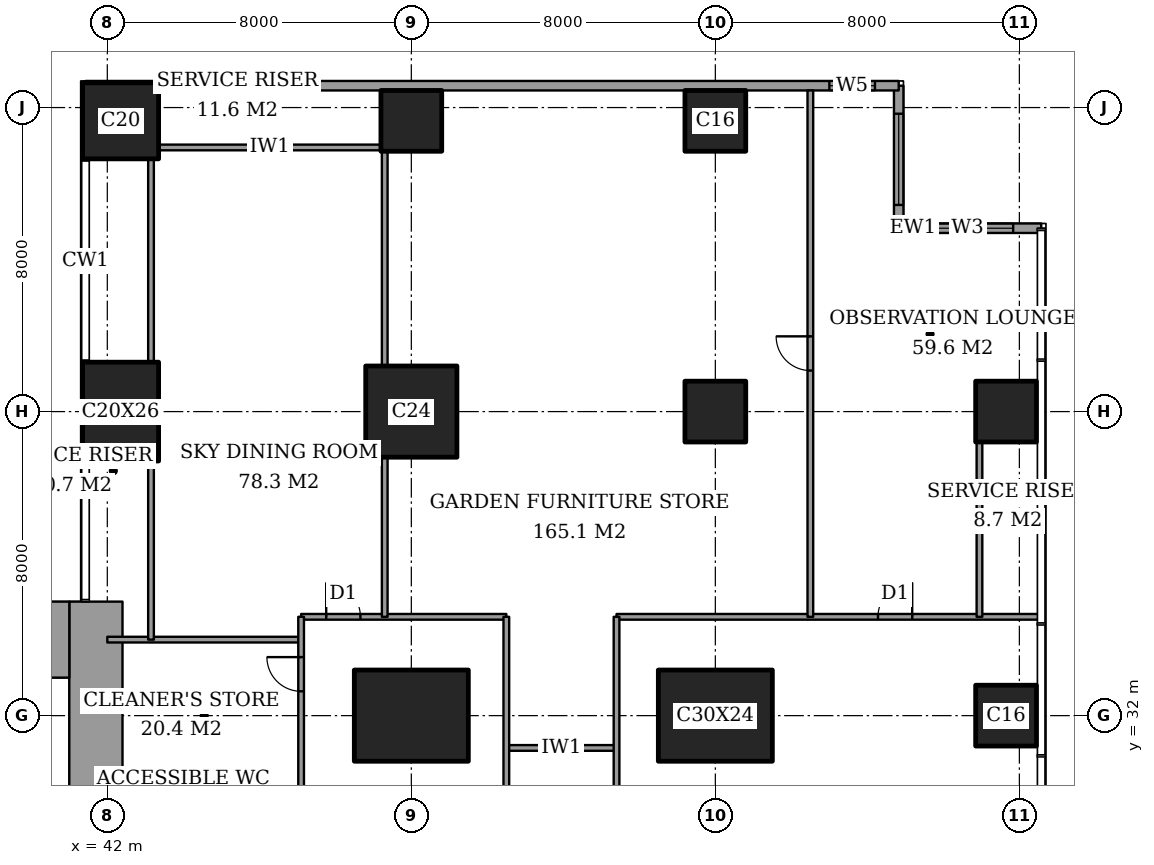
"""IFC4 building model, lengths in metres.
Left out: names, types, materials, properties, quantities, classifications, styles, units other than length and angle.
Written with IfcOpenShell. Run it as: python <this file> out.ifc"""

import sys

from ifc_helpers import new_model, si_unit, direction, frame, frame_2d, origin, origin_2d, place, context, subcontext, project, spatial, rectangle, extrude, element, fill, save


model = new_model("IFC4")
c1 = context("Model", 3, precision=1e-05, world=origin(), true_north=direction((0.0, 1.0)))
c2 = subcontext(c1, "Body", "Model", "MODEL_VIEW")
j1 = project(units=[si_unit("LENGTHUNIT", "METRE"), si_unit("PLANEANGLEUNIT", "RADIAN")], contexts=[c1])
p1 = place(None, origin())
s1 = spatial("IfcSite", under=j1, at=p1, CompositionType="ELEMENT")
p2 = place(p1, origin())
s2 = spatial("IfcBuilding", under=s1, at=p2, CompositionType="ELEMENT")
p3 = place(p2, frame((0.0, 0.0, 225.4)))
s3 = spatial("IfcBuildingStorey", under=s2, at=p3, CompositionType="ELEMENT", Elevation=225.4)
p4 = place(p3, frame((42.35, 40.0, 0.0), z_axis=(0.0, 0.0, 1.0), x_axis=(1.0, 0.0, 0.0)))
e1 = element("IfcColumn", 1, at=p4, inside=s3, PredefinedType="COLUMN", context=c2, shape_type="SweptSolid", body=[
    extrude(rectangle(XDim=2.0, YDim=2.6, at=origin_2d()), origin(), (0.0, 0.0, 1.0), 5.0),
])
p5 = place(p3, frame((42.35, 47.65, 0.0), z_axis=(0.0, 0.0, 1.0), x_axis=(1.0, 0.0, 0.0)))
e2 = element("IfcColumn", 2, at=p5, inside=s3, PredefinedType="COLUMN", context=c2, shape_type="SweptSolid", body=[
    extrude(rectangle(XDim=2.0, YDim=2.0, at=origin_2d()), origin(), (0.0, 0.0, 1.0), 5.0),
])
p6 = place(p3, frame((50.0, 32.0, 0.0), z_axis=(0.0, 0.0, 1.0), x_axis=(1.0, 0.0, 0.0)))
e3 = element("IfcColumn", 3, at=p6, inside=s3, PredefinedType="COLUMN", context=c2, shape_type="SweptSolid", body=[
    extrude(rectangle(XDim=3.0, YDim=2.4, at=origin_2d()), origin(), (0.0, 0.0, 1.0), 5.0),
])
p7 = place(p3, frame((50.0, 40.0, 0.0), z_axis=(0.0, 0.0, 1.0), x_axis=(1.0, 0.0, 0.0)))
e4 = element("IfcColumn", 4, at=p7, inside=s3, PredefinedType="COLUMN", context=c2, shape_type="SweptSolid", body=[
    extrude(rectangle(XDim=2.4, YDim=2.4, at=origin_2d()), origin(), (0.0, 0.0, 1.0), 5.0),
])
p8 = place(p3, frame((50.0, 47.65, 0.0), z_axis=(0.0, 0.0, 1.0), x_axis=(1.0, 0.0, 0.0)))
e5 = element("IfcColumn", 5, at=p8, inside=s3, PredefinedType="COLUMN", context=c2, shape_type="SweptSolid", body=[
    extrude(rectangle(XDim=1.6, YDim=1.6, at=origin_2d()), origin(), (0.0, 0.0, 1.0), 5.0),
])
p9 = place(p3, frame((58.0, 32.0, 0.0), z_axis=(0.0, 0.0, 1.0), x_axis=(1.0, 0.0, 0.0)))
e6 = element("IfcColumn", 6, at=p9, inside=s3, PredefinedType="COLUMN", context=c2, shape_type="SweptSolid", body=[
    extrude(rectangle(XDim=3.0, YDim=2.4, at=origin_2d()), origin(), (0.0, 0.0, 1.0), 5.0),
])
for number, where, z_axis, x_axis in (
    (7, (58.0, 40.0, 0.0), (0.0, 0.0, 1.0), (1.0, 0.0, 0.0)),
    (8, (58.0, 47.65, 0.0), (0.0, 0.0, 1.0), (1.0, 0.0, 0.0)),
    (9, (65.65, 32.0, 0.0), (0.0, 0.0, 1.0), (1.0, 0.0, 0.0)),
    (10, (65.65, 40.0, 0.0), (0.0, 0.0, 1.0), (1.0, 0.0, 0.0)),
):
    element("IfcColumn", number, at=place(p3, frame(where, z_axis=z_axis, x_axis=x_axis)), inside=s3, PredefinedType="COLUMN", context=c2, shape_type="SweptSolid", body=[
        extrude(rectangle(XDim=1.6, YDim=1.6, at=origin_2d()), origin(), (0.0, 0.0, 1.0), 5.0),
    ])
p10 = place(p3, frame((37.85, 34.0, 0.0), z_axis=(0.0, 0.0, 1.0), x_axis=(1.0, 0.0, 0.0)))
e11 = element("IfcWall", 11, at=p10, inside=s3, PredefinedType="SHEAR", context=c2, shape_type="SweptSolid", body=[
    extrude(rectangle(XDim=3.15, YDim=2.0, at=frame_2d((1.575, 0.0))), origin(), (0.0, 0.0, 1.0), 5.0),
])
p11 = place(p3, frame((41.7, 24.85, 0.0), z_axis=(0.0, 0.0, 1.0), x_axis=(0.0, 1.0, 0.0)))
e12 = element("IfcWall", 12, at=p11, inside=s3, PredefinedType="SHEAR", context=c2, shape_type="SweptSolid", body=[
    extrude(rectangle(XDim=10.15, YDim=1.4, at=frame_2d((5.075, 0.0))), origin(), (0.0, 0.0, 1.0), 5.0),
])
p12 = place(p3, frame((66.575, 44.825, 0.0), z_axis=(0.0, 0.0, 1.0), x_axis=(-1.0, 0.0, 0.0)))
e13 = element("IfcWall", 13, at=p12, inside=s3, PredefinedType="SOLIDWALL", context=c2, shape_type="SweptSolid", body=[
    extrude(rectangle(XDim=3.75, YDim=0.25, at=frame_2d((1.875, 0.0))), origin(), (0.0, 0.0, 1.0), 5.0),
])
p13 = place(p12, frame((0.738, 0.0, 0.6)))
e14 = element("IfcOpeningElement", 14, at=p13, cuts=e13, PredefinedType="OPENING", context=c2, shape_type="SweptSolid", body=[
    extrude(rectangle(XDim=2.4, YDim=3.0, at=frame_2d((1.2, 1.5))), frame((0.0, 0.135, 0.0), z_axis=(0.0, -1.0, 0.0), x_axis=(1.0, 0.0, 0.0)), (0.0, 0.0, 1.0), 0.27),
])
p14 = place(p3, frame((62.825, 44.825, 0.0), z_axis=(0.0, 0.0, 1.0), x_axis=(0.0, 1.0, 0.0)))
e15 = element("IfcWall", 15, at=p14, inside=s3, PredefinedType="SOLIDWALL", context=c2, shape_type="SweptSolid", body=[
    extrude(rectangle(XDim=3.75, YDim=0.25, at=frame_2d((1.875, 0.0))), origin(), (0.0, 0.0, 1.0), 5.0),
])
p15 = place(p14, frame((0.613, 0.0, 0.6)))
e16 = element("IfcOpeningElement", 16, at=p15, cuts=e15, PredefinedType="OPENING", context=c2, shape_type="SweptSolid", body=[
    extrude(rectangle(XDim=2.4, YDim=3.0, at=frame_2d((1.2, 1.5))), frame((0.0, 0.135, 0.0), z_axis=(0.0, -1.0, 0.0), x_axis=(1.0, 0.0, 0.0)), (0.0, 0.0, 1.0), 0.27),
])
p16 = place(p3, frame((62.825, 48.575, 0.0), z_axis=(0.0, 0.0, 1.0), x_axis=(-1.0, 0.0, 0.0)))
e17 = element("IfcWall", 17, at=p16, inside=s3, PredefinedType="SOLIDWALL", context=c2, shape_type="SweptSolid", body=[
    extrude(rectangle(XDim=21.4, YDim=0.25, at=frame_2d((10.7, 0.0))), origin(), (0.0, 0.0, 1.0), 5.0),
])
p17 = place(p16, frame((0.625, 0.0, 0.6)))
e18 = element("IfcOpeningElement", 18, at=p17, cuts=e17, PredefinedType="OPENING", context=c2, shape_type="SweptSolid", body=[
    extrude(rectangle(XDim=1.2, YDim=3.0, at=frame_2d((0.6, 1.5))), frame((0.0, 0.135, 0.0), z_axis=(0.0, -1.0, 0.0), x_axis=(1.0, 0.0, 0.0)), (0.0, 0.0, 1.0), 0.27),
])
p18 = place(p3, frame((52.5, 31.15, 0.0), z_axis=(0.0, 0.0, 1.0), x_axis=(1.0, 0.0, 0.0)))
e19 = element("IfcWall", 19, at=p18, inside=s3, PredefinedType="PARTITIONING", context=c2, shape_type="SweptSolid", body=[
    extrude(rectangle(XDim=2.9, YDim=0.15, at=frame_2d((1.45, 0.0))), origin(), (0.0, 0.0, 1.0), 4.75),
])
p19 = place(p3, frame((42.0, 34.0, 0.0), z_axis=(0.0, 0.0, 1.0), x_axis=(1.0, 0.0, 0.0)))
e20 = element("IfcWall", 20, at=p19, inside=s3, PredefinedType="PARTITIONING", context=c2, shape_type="SweptSolid", body=[
    extrude(rectangle(XDim=5.1, YDim=0.15, at=frame_2d((2.55, 0.0))), origin(), (0.0, 0.0, 1.0), 4.75),
])
p20 = place(p3, frame((47.1, 34.6, 0.0), z_axis=(0.0, 0.0, 1.0), x_axis=(1.0, 0.0, 0.0)))
e21 = element("IfcWall", 21, at=p20, inside=s3, PredefinedType="PARTITIONING", context=c2, shape_type="SweptSolid", body=[
    extrude(rectangle(XDim=5.4, YDim=0.15, at=frame_2d((2.7, 0.0))), origin(), (0.0, 0.0, 1.0), 4.75),
])
p21 = place(p20, frame((0.66, 0.0, 0.0)))
e22 = element("IfcOpeningElement", 22, at=p21, cuts=e21, PredefinedType="OPENING", context=c2, shape_type="SweptSolid", body=[
    extrude(rectangle(XDim=0.9, YDim=2.1, at=frame_2d((0.45, 1.05))), frame((0.0, 0.085, 0.0), z_axis=(0.0, -1.0, 0.0), x_axis=(1.0, 0.0, 0.0)), (0.0, 0.0, 1.0), 0.17),
])
p22 = place(p3, frame((55.4, 34.6, 0.0), z_axis=(0.0, 0.0, 1.0), x_axis=(1.0, 0.0, 0.0)))
e23 = element("IfcWall", 23, at=p22, inside=s3, PredefinedType="PARTITIONING", context=c2, shape_type="SweptSolid", body=[
    extrude(rectangle(XDim=11.161, YDim=0.15, at=frame_2d((5.581, 0.0))), origin(), (0.0, 0.0, 1.0), 4.75),
])
p23 = place(p22, frame((6.88, 0.0, 0.0)))
e24 = element("IfcOpeningElement", 24, at=p23, cuts=e23, PredefinedType="OPENING", context=c2, shape_type="SweptSolid", body=[
    extrude(rectangle(XDim=0.9, YDim=2.1, at=frame_2d((0.45, 1.05))), frame((0.0, 0.085, 0.0), z_axis=(0.0, -1.0, 0.0), x_axis=(1.0, 0.0, 0.0)), (0.0, 0.0, 1.0), 0.17),
])
p24 = place(p3, frame((43.35, 46.95, 0.0), z_axis=(0.0, 0.0, 1.0), x_axis=(1.0, 0.0, 0.0)))
e25 = element("IfcWall", 25, at=p24, inside=s3, PredefinedType="PARTITIONING", context=c2, shape_type="SweptSolid", body=[
    extrude(rectangle(XDim=5.85, YDim=0.15, at=frame_2d((2.925, 0.0))), origin(), (0.0, 0.0, 1.0), 4.75),
])
p25 = place(p3, frame((43.15, 34.0, 0.0), z_axis=(0.0, 0.0, 1.0), x_axis=(0.0, 1.0, 0.0)))
e26 = element("IfcWall", 26, at=p25, inside=s3, PredefinedType="PARTITIONING", context=c2, shape_type="SweptSolid", body=[
    extrude(rectangle(XDim=4.7, YDim=0.15, at=frame_2d((2.35, 0.0))), origin(), (0.0, 0.0, 1.0), 4.75),
])
p26 = place(p3, frame((43.15, 41.3, 0.0), z_axis=(0.0, 0.0, 1.0), x_axis=(0.0, 1.0, 0.0)))
e27 = element("IfcWall", 27, at=p26, inside=s3, PredefinedType="PARTITIONING", context=c2, shape_type="SweptSolid", body=[
    extrude(rectangle(XDim=5.35, YDim=0.15, at=frame_2d((2.675, 0.0))), origin(), (0.0, 0.0, 1.0), 4.75),
])
p27 = place(p3, frame((47.1, 30.0, 0.0), z_axis=(0.0, 0.0, 1.0), x_axis=(0.0, 1.0, 0.0)))
e28 = element("IfcWall", 28, at=p27, inside=s3, PredefinedType="PARTITIONING", context=c2, shape_type="SweptSolid", body=[
    extrude(rectangle(XDim=4.6, YDim=0.15, at=frame_2d((2.3, 0.0))), origin(), (0.0, 0.0, 1.0), 4.75),
])
p28 = place(p27, frame((2.64, 0.0, 0.0)))
e29 = element("IfcOpeningElement", 29, at=p28, cuts=e28, PredefinedType="OPENING", context=c2, shape_type="SweptSolid", body=[
    extrude(rectangle(XDim=0.9, YDim=2.1, at=frame_2d((0.45, 1.05))), frame((0.0, 0.085, 0.0), z_axis=(0.0, -1.0, 0.0), x_axis=(1.0, 0.0, 0.0)), (0.0, 0.0, 1.0), 0.17),
])
p29 = place(p3, frame((49.3, 34.6, 0.0), z_axis=(0.0, 0.0, 1.0), x_axis=(0.0, 1.0, 0.0)))
e30 = element("IfcWall", 30, at=p29, inside=s3, PredefinedType="PARTITIONING", context=c2, shape_type="SweptSolid", body=[
    extrude(rectangle(XDim=4.2, YDim=0.15, at=frame_2d((2.1, 0.0))), origin(), (0.0, 0.0, 1.0), 4.75),
])
p30 = place(p3, frame((49.3, 41.2, 0.0), z_axis=(0.0, 0.0, 1.0), x_axis=(0.0, 1.0, 0.0)))
e31 = element("IfcWall", 31, at=p30, inside=s3, PredefinedType="PARTITIONING", context=c2, shape_type="SweptSolid", body=[
    extrude(rectangle(XDim=5.65, YDim=0.15, at=frame_2d((2.825, 0.0))), origin(), (0.0, 0.0, 1.0), 4.75),
])
p31 = place(p3, frame((52.5, 13.4, 0.0), z_axis=(0.0, 0.0, 1.0), x_axis=(0.0, 1.0, 0.0)))
e32 = element("IfcWall", 32, at=p31, inside=s3, PredefinedType="PARTITIONING", context=c2, shape_type="SweptSolid", body=[
    extrude(rectangle(XDim=21.2, YDim=0.15, at=frame_2d((10.6, 0.0))), origin(), (0.0, 0.0, 1.0), 4.75),
])
p32 = place(p31, frame((10.15, 0.0, 0.0)))
e33 = element("IfcOpeningElement", 33, at=p32, cuts=e32, PredefinedType="OPENING", context=c2, shape_type="SweptSolid", body=[
    extrude(rectangle(XDim=0.9, YDim=2.1, at=frame_2d((0.45, 1.05))), frame((0.0, 0.085, 0.0), z_axis=(0.0, -1.0, 0.0), x_axis=(1.0, 0.0, 0.0)), (0.0, 0.0, 1.0), 0.17),
])
p33 = place(p3, frame((55.4, 13.4, 0.0), z_axis=(0.0, 0.0, 1.0), x_axis=(0.0, 1.0, 0.0)))
e34 = element("IfcWall", 34, at=p33, inside=s3, PredefinedType="PARTITIONING", context=c2, shape_type="SweptSolid", body=[
    extrude(rectangle(XDim=21.2, YDim=0.15, at=frame_2d((10.6, 0.0))), origin(), (0.0, 0.0, 1.0), 4.75),
])
p34 = place(p33, frame((10.09, 0.0, 0.0)))
e35 = element("IfcOpeningElement", 35, at=p34, cuts=e34, PredefinedType="OPENING", context=c2, shape_type="SweptSolid", body=[
    extrude(rectangle(XDim=1.0, YDim=2.1, at=frame_2d((0.5, 1.05))), frame((0.0, 0.085, 0.0), z_axis=(0.0, -1.0, 0.0), x_axis=(1.0, 0.0, 0.0)), (0.0, 0.0, 1.0), 0.17),
])
p35 = place(p3, frame((60.5, 34.6, 0.0), z_axis=(0.0, 0.0, 1.0), x_axis=(0.0, 1.0, 0.0)))
e36 = element("IfcWall", 36, at=p35, inside=s3, PredefinedType="PARTITIONING", context=c2, shape_type="SweptSolid", body=[
    extrude(rectangle(XDim=13.85, YDim=0.15, at=frame_2d((6.925, 0.0))), origin(), (0.0, 0.0, 1.0), 4.75),
])
p36 = place(p35, frame((6.48, 0.0, 0.0)))
e37 = element("IfcOpeningElement", 37, at=p36, cuts=e36, PredefinedType="OPENING", context=c2, shape_type="SweptSolid", body=[
    extrude(rectangle(XDim=0.9, YDim=2.1, at=frame_2d((0.45, 1.05))), frame((0.0, 0.085, 0.0), z_axis=(0.0, -1.0, 0.0), x_axis=(1.0, 0.0, 0.0)), (0.0, 0.0, 1.0), 0.17),
])
p37 = place(p3, frame((64.95, 34.6, 0.0), z_axis=(0.0, 0.0, 1.0), x_axis=(0.0, 1.0, 0.0)))
e38 = element("IfcWall", 38, at=p37, inside=s3, PredefinedType="PARTITIONING", context=c2, shape_type="SweptSolid", body=[
    extrude(rectangle(XDim=4.6, YDim=0.15, at=frame_2d((2.3, 0.0))), origin(), (0.0, 0.0, 1.0), 4.75),
])
p38 = place(p13, origin())
e39 = element("IfcWindow", 39, at=p38, inside=s3, PartitioningType="SINGLE_PANEL", PredefinedType="WINDOW", context=c2, shape_type="SweptSolid", body=[
    extrude(rectangle(XDim=2.4, YDim=3.0, at=frame_2d((1.2, 1.5))), frame((0.0, 0.03, 0.0), z_axis=(0.0, -1.0, 0.0), x_axis=(1.0, 0.0, 0.0)), (0.0, 0.0, 1.0), 0.06),
])
fill(e14, e39)
p39 = place(p15, origin())
e40 = element("IfcWindow", 40, at=p39, inside=s3, PartitioningType="SINGLE_PANEL", PredefinedType="WINDOW", context=c2, shape_type="SweptSolid", body=[
    extrude(rectangle(XDim=2.4, YDim=3.0, at=frame_2d((1.2, 1.5))), frame((0.0, 0.03, 0.0), z_axis=(0.0, -1.0, 0.0), x_axis=(1.0, 0.0, 0.0)), (0.0, 0.0, 1.0), 0.06),
])
fill(e16, e40)
p40 = place(p17, origin())
e41 = element("IfcWindow", 41, at=p40, inside=s3, PartitioningType="SINGLE_PANEL", PredefinedType="WINDOW", context=c2, shape_type="SweptSolid", body=[
    extrude(rectangle(XDim=1.2, YDim=3.0, at=frame_2d((0.6, 1.5))), frame((0.0, 0.03, 0.0), z_axis=(0.0, -1.0, 0.0), x_axis=(1.0, 0.0, 0.0)), (0.0, 0.0, 1.0), 0.06),
])
fill(e18, e41)
p41 = place(p28, origin())
e42 = element("IfcDoor", 42, at=p41, inside=s3, OperationType="SINGLE_SWING_LEFT", PredefinedType="DOOR", context=c2, shape_type="SweptSolid", body=[
    extrude(rectangle(XDim=0.9, YDim=2.1, at=frame_2d((0.45, 1.05))), frame((0.0, 0.025, 0.0), z_axis=(0.0, -1.0, 0.0), x_axis=(1.0, 0.0, 0.0)), (0.0, 0.0, 1.0), 0.05),
])
fill(e29, e42)
p42 = place(p23, origin())
e43 = element("IfcDoor", 43, at=p42, inside=s3, OperationType="SINGLE_SWING_LEFT", PredefinedType="DOOR", context=c2, shape_type="SweptSolid", body=[
    extrude(rectangle(XDim=0.9, YDim=2.1, at=frame_2d((0.45, 1.05))), frame((0.0, 0.025, 0.0), z_axis=(0.0, -1.0, 0.0), x_axis=(1.0, 0.0, 0.0)), (0.0, 0.0, 1.0), 0.05),
])
fill(e24, e43)
p43 = place(p36, origin())
e44 = element("IfcDoor", 44, at=p43, inside=s3, OperationType="SINGLE_SWING_LEFT", PredefinedType="DOOR", context=c2, shape_type="SweptSolid", body=[
    extrude(rectangle(XDim=0.9, YDim=2.1, at=frame_2d((0.45, 1.05))), frame((0.0, 0.025, 0.0), z_axis=(0.0, -1.0, 0.0), x_axis=(1.0, 0.0, 0.0)), (0.0, 0.0, 1.0), 0.05),
])
fill(e37, e44)
p44 = place(p21, origin())
e45 = element("IfcDoor", 45, at=p44, inside=s3, OperationType="SINGLE_SWING_RIGHT", PredefinedType="DOOR", context=c2, shape_type="SweptSolid", body=[
    extrude(rectangle(XDim=0.9, YDim=2.1, at=frame_2d((0.45, 1.05))), frame((0.0, 0.025, 0.0), z_axis=(0.0, -1.0, 0.0), x_axis=(1.0, 0.0, 0.0)), (0.0, 0.0, 1.0), 0.05),
])
fill(e22, e45)
save(model, sys.argv[1])
